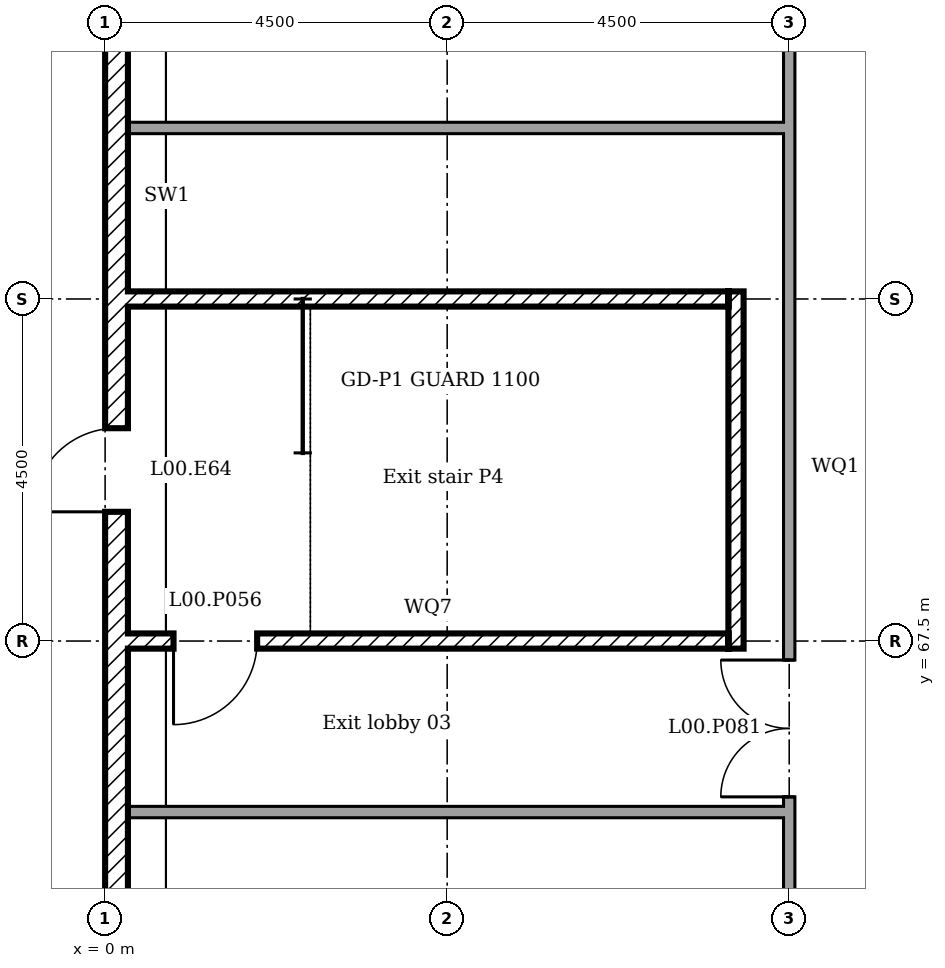
"""IFC4 building model, lengths in metres.
Left out: names, types, materials, properties, quantities, classifications, styles, units other than length and angle.
Written with IfcOpenShell. Run it as: python <this file> out.ifc"""

import sys

from ifc_helpers import new_model, si_unit, direction, frame, frame_2d, origin, place, context, subcontext, project, spatial, rectangle, extrude, element, fill, save


model = new_model("IFC4")
c1 = context("Model", 3, precision=1e-05, world=origin(), true_north=direction((0.0, 1.0)))
c2 = subcontext(c1, "Body", "Model", "MODEL_VIEW")
j1 = project(units=[si_unit("LENGTHUNIT", "METRE"), si_unit("PLANEANGLEUNIT", "RADIAN")], contexts=[c1])
p1 = place(None, origin())
s1 = spatial("IfcSite", under=j1, at=p1, CompositionType="ELEMENT")
p2 = place(p1, origin())
s2 = spatial("IfcBuilding", under=s1, at=p2, CompositionType="ELEMENT")
p3 = place(p2, origin())
s3 = spatial("IfcBuildingStorey", under=s2, at=p3, CompositionType="ELEMENT", Elevation=0.0)
p4 = place(p3, frame((0.15, 75.9, 0.0), z_axis=(0.0, 0.0, 1.0), x_axis=(0.0, -1.0, 0.0)))
e1 = element("IfcWall", 1, at=p4, inside=s3, PredefinedType="ELEMENTEDWALL", context=c2, shape_type="SweptSolid", body=[
    extrude(rectangle(XDim=5.1, YDim=0.3, at=frame_2d((2.55, 0.0))), origin(), (0.0, 0.0, 1.0), 5.55),
])
p5 = place(p3, frame((0.15, 70.8, 0.0), z_axis=(0.0, 0.0, 1.0), x_axis=(0.0, -1.0, 0.0)))
e2 = element("IfcWall", 2, at=p5, inside=s3, PredefinedType="ELEMENTEDWALL", context=c2, shape_type="SweptSolid", body=[
    extrude(rectangle(XDim=2.1, YDim=0.3, at=frame_2d((1.05, 0.0))), origin(), (0.0, 0.0, 1.0), 5.55),
])
p6 = place(p5, frame((0.5, 0.0, 0.0)))
e3 = element("IfcOpeningElement", 3, at=p6, cuts=e2, PredefinedType="OPENING", context=c2, shape_type="SweptSolid", body=[
    extrude(rectangle(XDim=1.1, YDim=2.4, at=frame_2d((0.55, 1.2))), frame((0.0, 0.16, 0.0), z_axis=(0.0, -1.0, 0.0), x_axis=(1.0, 0.0, 0.0)), (0.0, 0.0, 1.0), 0.32),
])
p7 = place(p3, frame((0.15, 68.7, 0.0), z_axis=(0.0, 0.0, 1.0), x_axis=(0.0, -1.0, 0.0)))
e4 = element("IfcWall", 4, at=p7, inside=s3, PredefinedType="ELEMENTEDWALL", context=c2, shape_type="SweptSolid", body=[
    extrude(rectangle(XDim=5.1, YDim=0.3, at=frame_2d((2.55, 0.0))), origin(), (0.0, 0.0, 1.0), 5.55),
])
p8 = place(p3, frame((9.0, 63.595, 0.0), z_axis=(0.0, 0.0, 1.0), x_axis=(0.0, 1.0, 0.0)))
e5 = element("IfcWall", 5, at=p8, inside=s3, PredefinedType="PARTITIONING", context=c2, shape_type="SweptSolid", body=[
    extrude(rectangle(XDim=1.73, YDim=0.15, at=frame_2d((0.865, 0.0))), origin(), (0.0, 0.0, 1.0), 5.55),
])
p9 = place(p3, frame((9.0, 65.25, 0.0), z_axis=(0.0, 0.0, 1.0), x_axis=(0.0, 1.0, 0.0)))
e6 = element("IfcWall", 6, at=p9, inside=s3, PredefinedType="PARTITIONING", context=c2, shape_type="SweptSolid", body=[
    extrude(rectangle(XDim=9.075, YDim=0.15, at=frame_2d((4.538, 0.0))), origin(), (0.0, 0.0, 1.0), 5.55),
])
p10 = place(p9, frame((0.2, 0.0, 0.0)))
e7 = element("IfcOpeningElement", 7, at=p10, cuts=e6, PredefinedType="OPENING", context=c2, shape_type="SweptSolid", body=[
    extrude(rectangle(XDim=1.8, YDim=2.1, at=frame_2d((0.9, 1.05))), frame((0.0, 0.085, 0.0), z_axis=(0.0, -1.0, 0.0), x_axis=(1.0, 0.0, 0.0)), (0.0, 0.0, 1.0), 0.17),
])
p11 = place(p3, frame((9.0, 74.25, 0.0), z_axis=(0.0, 0.0, 1.0), x_axis=(0.0, 1.0, 0.0)))
e8 = element("IfcWall", 8, at=p11, inside=s3, PredefinedType="PARTITIONING", context=c2, shape_type="SweptSolid", body=[
    extrude(rectangle(XDim=1.655, YDim=0.15, at=frame_2d((0.828, 0.0))), origin(), (0.0, 0.0, 1.0), 5.55),
])
for number, where in (
    (9, (0.3, 65.25, 0.0)),
    (10, (0.3, 74.25, 0.0)),
):
    element("IfcWall", number, at=place(p3, frame(where)), inside=s3, PredefinedType="PARTITIONING", context=c2, shape_type="SweptSolid", body=[
        extrude(rectangle(XDim=8.625, YDim=0.15, at=frame_2d((4.312, 0.0))), origin(), (0.0, 0.0, 1.0), 5.55),
    ])
p12 = place(p3, frame((8.3, 67.4, 0.0), z_axis=(0.0, 0.0, 1.0), x_axis=(0.0, 1.0, 0.0)))
e11 = element("IfcWall", 11, at=p12, inside=s3, PredefinedType="SOLIDWALL", context=c2, shape_type="SweptSolid", body=[
    extrude(rectangle(XDim=4.7, YDim=0.2, at=frame_2d((2.35, 0.0))), origin(), (0.0, 0.0, 1.0), 5.55),
])
p13 = place(p3, frame((0.3, 67.5, 0.0)))
e12 = element("IfcWall", 12, at=p13, inside=s3, PredefinedType="SOLIDWALL", context=c2, shape_type="SweptSolid", body=[
    extrude(rectangle(XDim=7.9, YDim=0.2, at=frame_2d((3.95, 0.0))), origin(), (0.0, 0.0, 1.0), 5.55),
])
p14 = place(p13, frame((0.6, 0.0, 0.0)))
e13 = element("IfcOpeningElement", 13, at=p14, cuts=e12, PredefinedType="OPENING", context=c2, shape_type="SweptSolid", body=[
    extrude(rectangle(XDim=1.1, YDim=2.1, at=frame_2d((0.55, 1.05))), frame((0.0, 0.11, 0.0), z_axis=(0.0, -1.0, 0.0), x_axis=(1.0, 0.0, 0.0)), (0.0, 0.0, 1.0), 0.22),
])
p15 = place(p3, frame((0.3, 72.0, 0.0)))
e14 = element("IfcWall", 14, at=p15, inside=s3, PredefinedType="SOLIDWALL", context=c2, shape_type="SweptSolid", body=[
    extrude(rectangle(XDim=7.9, YDim=0.2, at=frame_2d((3.95, 0.0))), origin(), (0.0, 0.0, 1.0), 5.55),
])
p16 = place(p6, frame((1.1, 0.0, 0.0), x_axis=(-1.0, 0.0, 0.0)))
e15 = element("IfcDoor", 15, at=p16, inside=s3, OperationType="SINGLE_SWING_RIGHT", PredefinedType="NOTDEFINED", context=c2, shape_type="SweptSolid", body=[
    extrude(rectangle(XDim=1.1, YDim=2.4, at=frame_2d((0.55, 1.2))), frame((0.0, 0.025, 0.0), z_axis=(0.0, -1.0, 0.0), x_axis=(1.0, 0.0, 0.0)), (0.0, 0.0, 1.0), 0.05),
])
fill(e3, e15)
p17 = place(p14, frame((1.1, 0.0, 0.0), x_axis=(-1.0, 0.0, 0.0)))
e16 = element("IfcDoor", 16, at=p17, inside=s3, OperationType="SINGLE_SWING_LEFT", PredefinedType="DOOR", context=c2, shape_type="SweptSolid", body=[
    extrude(rectangle(XDim=1.1, YDim=2.1, at=frame_2d((0.55, 1.05))), frame((0.0, 0.025, 0.0), z_axis=(0.0, -1.0, 0.0), x_axis=(1.0, 0.0, 0.0)), (0.0, 0.0, 1.0), 0.05),
])
fill(e13, e16)
p18 = place(p10, origin())
e17 = element("IfcDoor", 17, at=p18, inside=s3, OperationType="DOUBLE_DOOR_SINGLE_SWING", PredefinedType="DOOR", context=c2, shape_type="SweptSolid", body=[
    extrude(rectangle(XDim=1.8, YDim=2.1, at=frame_2d((0.9, 1.05))), frame((0.0, 0.025, 0.0), z_axis=(0.0, -1.0, 0.0), x_axis=(1.0, 0.0, 0.0)), (0.0, 0.0, 1.0), 0.05),
])
fill(e7, e17)
save(model, sys.argv[1])
